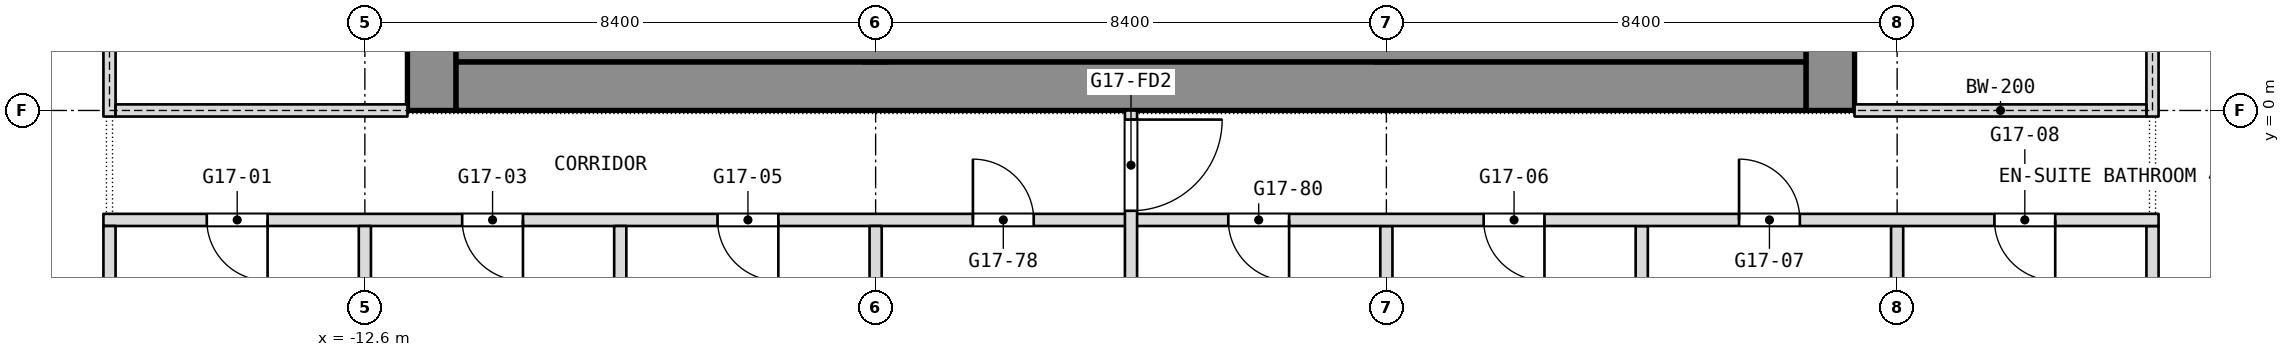
"""IFC4 building model, lengths in metres.
Left out: names, types, materials, properties, quantities, classifications, styles, units other than length and angle.
Written with IfcOpenShell. Run it as: python <this file> out.ifc"""

import sys

from ifc_helpers import new_model, si_unit, direction, frame, frame_2d, origin, place, context, subcontext, project, spatial, rectangle, extrude, element, fill, save


model = new_model("IFC4")
c1 = context("Model", 3, precision=1e-05, world=origin(), true_north=direction((0.0, 1.0)))
c2 = subcontext(c1, "Body", "Model", "MODEL_VIEW")
j1 = project(units=[si_unit("LENGTHUNIT", "METRE"), si_unit("PLANEANGLEUNIT", "RADIAN")], contexts=[c1])
p1 = place(None, origin())
s1 = spatial("IfcSite", under=j1, at=p1, CompositionType="ELEMENT")
p2 = place(p1, origin())
s2 = spatial("IfcBuilding", under=s1, at=p2, CompositionType="ELEMENT")
p3 = place(p2, frame((0.0, 0.0, 209.3)))
s3 = spatial("IfcBuildingStorey", under=s2, at=p3, CompositionType="ELEMENT", Elevation=209.3)
p4 = place(p3, frame((11.5, 0.0, 0.0), z_axis=(0.0, 0.0, 1.0), x_axis=(0.0, 1.0, 0.0)))
e1 = element("IfcWall", 1, at=p4, inside=s3, PredefinedType="SHEAR", context=c2, shape_type="SweptSolid", body=[
    extrude(rectangle(XDim=16.8, YDim=0.8, at=frame_2d((8.4, 0.0))), origin(), (0.0, 0.0, 1.0), 3.6),
])
p5 = place(p4, frame((2.3, 0.0, 0.0)))
e2 = element("IfcOpeningElement", 2, at=p5, cuts=e1, PredefinedType="OPENING", context=c2, shape_type="SweptSolid", body=[
    extrude(rectangle(XDim=1.1, YDim=2.1, at=frame_2d((0.55, 1.05))), frame((0.0, 0.4, 0.0), z_axis=(0.0, -1.0, 0.0), x_axis=(1.0, 0.0, 0.0)), (0.0, 0.0, 1.0), 0.8),
])
p6 = place(p4, frame((4.85, 0.0, 0.0)))
e3 = element("IfcOpeningElement", 3, at=p6, cuts=e1, PredefinedType="OPENING", context=c2, shape_type="SweptSolid", body=[
    extrude(rectangle(XDim=1.1, YDim=2.1, at=frame_2d((0.55, 1.05))), frame((0.0, 0.4, 0.0), z_axis=(0.0, -1.0, 0.0), x_axis=(1.0, 0.0, 0.0)), (0.0, 0.0, 1.0), 0.8),
])
p7 = place(p4, frame((6.825, 0.0, 0.0)))
e4 = element("IfcOpeningElement", 4, at=p7, cuts=e1, PredefinedType="OPENING", context=c2, shape_type="SweptSolid", body=[
    extrude(rectangle(XDim=1.2, YDim=2.1, at=frame_2d((0.6, 1.05))), frame((0.0, 0.4, 0.0), z_axis=(0.0, -1.0, 0.0), x_axis=(1.0, 0.0, 0.0)), (0.0, 0.0, 1.0), 0.8),
])
p8 = place(p4, frame((13.4, 0.0, 0.0)))
e5 = element("IfcOpeningElement", 5, at=p8, cuts=e1, PredefinedType="OPENING", context=c2, shape_type="SweptSolid", body=[
    extrude(rectangle(XDim=1.1, YDim=2.1, at=frame_2d((0.55, 1.05))), frame((0.0, 0.4, 0.0), z_axis=(0.0, -1.0, 0.0), x_axis=(1.0, 0.0, 0.0)), (0.0, 0.0, 1.0), 0.8),
])
p9 = place(p4, frame((10.85, 0.0, 0.0)))
e6 = element("IfcOpeningElement", 6, at=p9, cuts=e1, PredefinedType="OPENING", context=c2, shape_type="SweptSolid", body=[
    extrude(rectangle(XDim=1.1, YDim=2.1, at=frame_2d((0.55, 1.05))), frame((0.0, 0.4, 0.0), z_axis=(0.0, -1.0, 0.0), x_axis=(1.0, 0.0, 0.0)), (0.0, 0.0, 1.0), 0.8),
])
p10 = place(p4, frame((8.775, 0.0, 0.0)))
e7 = element("IfcOpeningElement", 7, at=p10, cuts=e1, PredefinedType="OPENING", context=c2, shape_type="SweptSolid", body=[
    extrude(rectangle(XDim=1.2, YDim=2.1, at=frame_2d((0.6, 1.05))), frame((0.0, 0.4, 0.0), z_axis=(0.0, -1.0, 0.0), x_axis=(1.0, 0.0, 0.0)), (0.0, 0.0, 1.0), 0.8),
])
p11 = place(p3, frame((-11.5, 0.0, 0.0), z_axis=(0.0, 0.0, 1.0), x_axis=(0.0, 1.0, 0.0)))
e8 = element("IfcWall", 8, at=p11, inside=s3, PredefinedType="SHEAR", context=c2, shape_type="SweptSolid", body=[
    extrude(rectangle(XDim=16.8, YDim=0.8, at=frame_2d((8.4, 0.0))), origin(), (0.0, 0.0, 1.0), 3.6),
])
p12 = place(p11, frame((1.762, 0.0, 0.0)))
e9 = element("IfcOpeningElement", 9, at=p12, cuts=e8, PredefinedType="OPENING", context=c2, shape_type="SweptSolid", body=[
    extrude(rectangle(XDim=0.9, YDim=2.1, at=frame_2d((0.45, 1.05))), frame((0.0, 0.4, 0.0), z_axis=(0.0, -1.0, 0.0), x_axis=(1.0, 0.0, 0.0)), (0.0, 0.0, 1.0), 0.8),
])
p13 = place(p11, frame((4.387, 0.0, 0.0)))
e10 = element("IfcOpeningElement", 10, at=p13, cuts=e8, PredefinedType="OPENING", context=c2, shape_type="SweptSolid", body=[
    extrude(rectangle(XDim=0.9, YDim=2.1, at=frame_2d((0.45, 1.05))), frame((0.0, 0.4, 0.0), z_axis=(0.0, -1.0, 0.0), x_axis=(1.0, 0.0, 0.0)), (0.0, 0.0, 1.0), 0.8),
])
p14 = place(p11, frame((6.825, 0.0, 0.0)))
e11 = element("IfcOpeningElement", 11, at=p14, cuts=e8, PredefinedType="OPENING", context=c2, shape_type="SweptSolid", body=[
    extrude(rectangle(XDim=1.2, YDim=2.1, at=frame_2d((0.6, 1.05))), frame((0.0, 0.4, 0.0), z_axis=(0.0, -1.0, 0.0), x_axis=(1.0, 0.0, 0.0)), (0.0, 0.0, 1.0), 0.8),
])
p15 = place(p11, frame((12.3, 0.0, 0.0)))
e12 = element("IfcOpeningElement", 12, at=p15, cuts=e8, PredefinedType="OPENING", context=c2, shape_type="SweptSolid", body=[
    extrude(rectangle(XDim=0.9, YDim=2.1, at=frame_2d((0.45, 1.05))), frame((0.0, 0.4, 0.0), z_axis=(0.0, -1.0, 0.0), x_axis=(1.0, 0.0, 0.0)), (0.0, 0.0, 1.0), 0.8),
])
p16 = place(p11, frame((8.775, 0.0, 0.0)))
e13 = element("IfcOpeningElement", 13, at=p16, cuts=e8, PredefinedType="OPENING", context=c2, shape_type="SweptSolid", body=[
    extrude(rectangle(XDim=1.2, YDim=2.1, at=frame_2d((0.6, 1.05))), frame((0.0, 0.4, 0.0), z_axis=(0.0, -1.0, 0.0), x_axis=(1.0, 0.0, 0.0)), (0.0, 0.0, 1.0), 0.8),
])
p17 = place(p3, frame((-11.1, 0.4, 0.0), z_axis=(0.0, 0.0, 1.0), x_axis=(1.0, 0.0, 0.0)))
e14 = element("IfcWall", 14, at=p17, inside=s3, PredefinedType="SHEAR", context=c2, shape_type="SweptSolid", body=[
    extrude(rectangle(XDim=22.2, YDim=0.8, at=frame_2d((11.1, 0.0))), origin(), (0.0, 0.0, 1.0), 3.6),
])
p18 = place(p3, frame((-4.2, 0.8, 0.0), z_axis=(0.0, 0.0, 1.0), x_axis=(0.0, 1.0, 0.0)))
e15 = element("IfcWall", 15, at=p18, inside=s3, PredefinedType="SHEAR", context=c2, shape_type="SweptSolid", body=[
    extrude(rectangle(XDim=15.2, YDim=0.4, at=frame_2d((7.6, 0.0))), origin(), (0.0, 0.0, 1.0), 3.6),
])
p19 = place(p18, frame((8.5, 0.0, 0.0)))
e16 = element("IfcOpeningElement", 16, at=p19, cuts=e15, PredefinedType="OPENING", context=c2, shape_type="SweptSolid", body=[
    extrude(rectangle(XDim=1.2, YDim=2.1, at=frame_2d((0.6, 1.05))), frame((0.0, 0.2, 0.0), z_axis=(0.0, -1.0, 0.0), x_axis=(1.0, 0.0, 0.0)), (0.0, 0.0, 1.0), 0.4),
])
p20 = place(p3, frame((4.2, 0.8, 0.0), z_axis=(0.0, 0.0, 1.0), x_axis=(0.0, 1.0, 0.0)))
e17 = element("IfcWall", 17, at=p20, inside=s3, PredefinedType="SHEAR", context=c2, shape_type="SweptSolid", body=[
    extrude(rectangle(XDim=15.2, YDim=0.4, at=frame_2d((7.6, 0.0))), origin(), (0.0, 0.0, 1.0), 3.6),
])
p21 = place(p20, frame((5.95, 0.0, 0.0)))
e18 = element("IfcOpeningElement", 18, at=p21, cuts=e17, PredefinedType="OPENING", context=c2, shape_type="SweptSolid", body=[
    extrude(rectangle(XDim=1.2, YDim=2.1, at=frame_2d((0.6, 1.05))), frame((0.0, 0.2, 0.0), z_axis=(0.0, -1.0, 0.0), x_axis=(1.0, 0.0, 0.0)), (0.0, 0.0, 1.0), 0.4),
])
for number, where, z_axis, x_axis in (
    (19, (16.8, -7.8, 0.0), (0.0, 0.0, 1.0), (0.0, 1.0, 0.0)),
    (20, (12.6, -7.8, 0.0), (0.0, 0.0, 1.0), (0.0, 1.0, 0.0)),
):
    element("IfcWall", number, at=place(p3, frame(where, z_axis=z_axis, x_axis=x_axis)), inside=s3, PredefinedType="PARTITIONING", context=c2, shape_type="SweptSolid", body=[
        extrude(rectangle(XDim=5.9, YDim=0.2, at=frame_2d((2.95, 0.0))), origin(), (0.0, 0.0, 1.0), 3.34),
    ])
p22 = place(p3, frame((8.4, -8.0, 0.0), z_axis=(0.0, 0.0, 1.0), x_axis=(0.0, 1.0, 0.0)))
e21 = element("IfcWall", 21, at=p22, inside=s3, PredefinedType="PARTITIONING", context=c2, shape_type="SweptSolid", body=[
    extrude(rectangle(XDim=6.1, YDim=0.2, at=frame_2d((3.05, 0.0))), origin(), (0.0, 0.0, 1.0), 3.34),
])
p23 = place(p3, frame((4.2, -11.6, 0.0), z_axis=(0.0, 0.0, 1.0), x_axis=(0.0, 1.0, 0.0)))
e22 = element("IfcWall", 22, at=p23, inside=s3, PredefinedType="PARTITIONING", context=c2, shape_type="SweptSolid", body=[
    extrude(rectangle(XDim=9.7, YDim=0.2, at=frame_2d((4.85, 0.0))), origin(), (0.0, 0.0, 1.0), 3.34),
])
p24 = place(p3, frame((-16.9, -1.8, 0.0), z_axis=(0.0, 0.0, 1.0), x_axis=(1.0, 0.0, 0.0)))
e23 = element("IfcWall", 23, at=p24, inside=s3, PredefinedType="PARTITIONING", context=c2, shape_type="SweptSolid", body=[
    extrude(rectangle(XDim=33.8, YDim=0.2, at=frame_2d((16.9, 0.0))), origin(), (0.0, 0.0, 1.0), 3.34),
])
p25 = place(p24, frame((1.7, 0.0, 0.0)))
e24 = element("IfcOpeningElement", 24, at=p25, cuts=e23, PredefinedType="OPENING", context=c2, shape_type="SweptSolid", body=[
    extrude(rectangle(XDim=1.0, YDim=2.1, at=frame_2d((0.5, 1.05))), frame((0.0, 0.1, 0.0), z_axis=(0.0, -1.0, 0.0), x_axis=(1.0, 0.0, 0.0)), (0.0, 0.0, 1.0), 0.2),
])
p26 = place(p24, frame((5.9, 0.0, 0.0)))
e25 = element("IfcOpeningElement", 25, at=p26, cuts=e23, PredefinedType="OPENING", context=c2, shape_type="SweptSolid", body=[
    extrude(rectangle(XDim=1.0, YDim=2.1, at=frame_2d((0.5, 1.05))), frame((0.0, 0.1, 0.0), z_axis=(0.0, -1.0, 0.0), x_axis=(1.0, 0.0, 0.0)), (0.0, 0.0, 1.0), 0.2),
])
p27 = place(p24, frame((10.1, 0.0, 0.0)))
e26 = element("IfcOpeningElement", 26, at=p27, cuts=e23, PredefinedType="OPENING", context=c2, shape_type="SweptSolid", body=[
    extrude(rectangle(XDim=1.0, YDim=2.1, at=frame_2d((0.5, 1.05))), frame((0.0, 0.1, 0.0), z_axis=(0.0, -1.0, 0.0), x_axis=(1.0, 0.0, 0.0)), (0.0, 0.0, 1.0), 0.2),
])
p28 = place(p24, frame((22.7, 0.0, 0.0)))
e27 = element("IfcOpeningElement", 27, at=p28, cuts=e23, PredefinedType="OPENING", context=c2, shape_type="SweptSolid", body=[
    extrude(rectangle(XDim=1.0, YDim=2.1, at=frame_2d((0.5, 1.05))), frame((0.0, 0.1, 0.0), z_axis=(0.0, -1.0, 0.0), x_axis=(1.0, 0.0, 0.0)), (0.0, 0.0, 1.0), 0.2),
])
p29 = place(p24, frame((26.9, 0.0, 0.0)))
e28 = element("IfcOpeningElement", 28, at=p29, cuts=e23, PredefinedType="OPENING", context=c2, shape_type="SweptSolid", body=[
    extrude(rectangle(XDim=1.0, YDim=2.1, at=frame_2d((0.5, 1.05))), frame((0.0, 0.1, 0.0), z_axis=(0.0, -1.0, 0.0), x_axis=(1.0, 0.0, 0.0)), (0.0, 0.0, 1.0), 0.2),
])
p30 = place(p24, frame((31.1, 0.0, 0.0)))
e29 = element("IfcOpeningElement", 29, at=p30, cuts=e23, PredefinedType="OPENING", context=c2, shape_type="SweptSolid", body=[
    extrude(rectangle(XDim=1.0, YDim=2.1, at=frame_2d((0.5, 1.05))), frame((0.0, 0.1, 0.0), z_axis=(0.0, -1.0, 0.0), x_axis=(1.0, 0.0, 0.0)), (0.0, 0.0, 1.0), 0.2),
])
p31 = place(p24, frame((14.3, 0.0, 0.0)))
e30 = element("IfcOpeningElement", 30, at=p31, cuts=e23, PredefinedType="OPENING", context=c2, shape_type="SweptSolid", body=[
    extrude(rectangle(XDim=1.0, YDim=2.1, at=frame_2d((0.5, 1.05))), frame((0.0, 0.1, 0.0), z_axis=(0.0, -1.0, 0.0), x_axis=(1.0, 0.0, 0.0)), (0.0, 0.0, 1.0), 0.2),
])
p32 = place(p24, frame((18.5, 0.0, 0.0)))
e31 = element("IfcOpeningElement", 31, at=p32, cuts=e23, PredefinedType="OPENING", context=c2, shape_type="SweptSolid", body=[
    extrude(rectangle(XDim=1.0, YDim=2.1, at=frame_2d((0.5, 1.05))), frame((0.0, 0.1, 0.0), z_axis=(0.0, -1.0, 0.0), x_axis=(1.0, 0.0, 0.0)), (0.0, 0.0, 1.0), 0.2),
])
p33 = place(p3, frame((0.0, -13.6, 0.0), z_axis=(0.0, 0.0, 1.0), x_axis=(0.0, 1.0, 0.0)))
e32 = element("IfcWall", 32, at=p33, inside=s3, PredefinedType="PARTITIONING", context=c2, shape_type="SweptSolid", body=[
    extrude(rectangle(XDim=13.6, YDim=0.2, at=frame_2d((6.8, 0.0))), origin(), (0.0, 0.0, 1.0), 3.34),
])
p34 = place(p33, frame((11.95, 0.0, 0.0)))
e33 = element("IfcOpeningElement", 33, at=p34, cuts=e32, PredefinedType="OPENING", context=c2, shape_type="SweptSolid", body=[
    extrude(rectangle(XDim=1.5, YDim=2.1, at=frame_2d((0.75, 1.05))), frame((0.0, 0.1, 0.0), z_axis=(0.0, -1.0, 0.0), x_axis=(1.0, 0.0, 0.0)), (0.0, 0.0, 1.0), 0.2),
])
p35 = place(p33, frame((0.25, 0.0, 0.0)))
e34 = element("IfcOpeningElement", 34, at=p35, cuts=e32, PredefinedType="OPENING", context=c2, shape_type="SweptSolid", body=[
    extrude(rectangle(XDim=1.5, YDim=2.1, at=frame_2d((0.75, 1.05))), frame((0.0, 0.1, 0.0), z_axis=(0.0, -1.0, 0.0), x_axis=(1.0, 0.0, 0.0)), (0.0, 0.0, 1.0), 0.2),
])
p36 = place(p3, frame((-4.2, -11.6, 0.0), z_axis=(0.0, 0.0, 1.0), x_axis=(0.0, 1.0, 0.0)))
e35 = element("IfcWall", 35, at=p36, inside=s3, PredefinedType="PARTITIONING", context=c2, shape_type="SweptSolid", body=[
    extrude(rectangle(XDim=9.7, YDim=0.2, at=frame_2d((4.85, 0.0))), origin(), (0.0, 0.0, 1.0), 3.34),
])
p37 = place(p3, frame((-8.4, -8.0, 0.0), z_axis=(0.0, 0.0, 1.0), x_axis=(0.0, 1.0, 0.0)))
e36 = element("IfcWall", 36, at=p37, inside=s3, PredefinedType="PARTITIONING", context=c2, shape_type="SweptSolid", body=[
    extrude(rectangle(XDim=6.1, YDim=0.2, at=frame_2d((3.05, 0.0))), origin(), (0.0, 0.0, 1.0), 3.34),
])
p38 = place(p3, frame((-12.6, -7.8, 0.0), z_axis=(0.0, 0.0, 1.0), x_axis=(0.0, 1.0, 0.0)))
e37 = element("IfcWall", 37, at=p38, inside=s3, PredefinedType="PARTITIONING", context=c2, shape_type="SweptSolid", body=[
    extrude(rectangle(XDim=5.9, YDim=0.2, at=frame_2d((2.95, 0.0))), origin(), (0.0, 0.0, 1.0), 3.34),
])
p39 = place(p3, frame((-16.8, -8.0, 0.0), z_axis=(0.0, 0.0, 1.0), x_axis=(0.0, 1.0, 0.0)))
e38 = element("IfcWall", 38, at=p39, inside=s3, PredefinedType="PARTITIONING", context=c2, shape_type="SweptSolid", body=[
    extrude(rectangle(XDim=6.1, YDim=0.2, at=frame_2d((3.05, 0.0))), origin(), (0.0, 0.0, 1.0), 3.34),
])
p40 = place(p3, frame((-11.1, 1.15, 0.0), z_axis=(0.0, 0.0, 1.0), x_axis=(1.0, 0.0, 0.0)))
e39 = element("IfcWall", 39, at=p40, inside=s3, PredefinedType="PARTITIONING", context=c2, shape_type="SweptSolid", body=[
    extrude(rectangle(XDim=22.2, YDim=0.7, at=frame_2d((11.1, 0.0))), origin(), (0.0, 0.0, 1.0), 3.34),
])
p41 = place(p3, frame((-16.8, -0.1, 0.0), z_axis=(0.0, 0.0, 1.0), x_axis=(0.0, 1.0, 0.0)))
e40 = element("IfcWall", 40, at=p41, inside=s3, PredefinedType="PARTITIONING", context=c2, shape_type="SweptSolid", body=[
    extrude(rectangle(XDim=17.0, YDim=0.2, at=frame_2d((8.5, 0.0))), origin(), (0.0, 0.0, 1.0), 3.34),
])
p42 = place(p41, frame((2.2, 0.0, 0.0)))
e41 = element("IfcOpeningElement", 41, at=p42, cuts=e40, PredefinedType="OPENING", context=c2, shape_type="SweptSolid", body=[
    extrude(rectangle(XDim=1.8, YDim=2.1, at=frame_2d((0.9, 1.05))), frame((0.0, 0.1, 0.0), z_axis=(0.0, -1.0, 0.0), x_axis=(1.0, 0.0, 0.0)), (0.0, 0.0, 1.0), 0.2),
])
p43 = place(p41, frame((13.0, 0.0, 0.0)))
e42 = element("IfcOpeningElement", 42, at=p43, cuts=e40, PredefinedType="OPENING", context=c2, shape_type="SweptSolid", body=[
    extrude(rectangle(XDim=1.8, YDim=2.1, at=frame_2d((0.9, 1.05))), frame((0.0, 0.1, 0.0), z_axis=(0.0, -1.0, 0.0), x_axis=(1.0, 0.0, 0.0)), (0.0, 0.0, 1.0), 0.2),
])
p44 = place(p3, frame((-16.7, 0.0, 0.0), z_axis=(0.0, 0.0, 1.0), x_axis=(1.0, 0.0, 0.0)))
e43 = element("IfcWall", 43, at=p44, inside=s3, PredefinedType="PARTITIONING", context=c2, shape_type="SweptSolid", body=[
    extrude(rectangle(XDim=4.8, YDim=0.2, at=frame_2d((2.4, 0.0))), origin(), (0.0, 0.0, 1.0), 2.94),
])
p45 = place(p3, frame((16.8, -0.1, 0.0), z_axis=(0.0, 0.0, 1.0), x_axis=(0.0, 1.0, 0.0)))
e44 = element("IfcWall", 44, at=p45, inside=s3, PredefinedType="PARTITIONING", context=c2, shape_type="SweptSolid", body=[
    extrude(rectangle(XDim=17.0, YDim=0.2, at=frame_2d((8.5, 0.0))), origin(), (0.0, 0.0, 1.0), 3.34),
])
p46 = place(p45, frame((2.2, 0.0, 0.0)))
e45 = element("IfcOpeningElement", 45, at=p46, cuts=e44, PredefinedType="OPENING", context=c2, shape_type="SweptSolid", body=[
    extrude(rectangle(XDim=1.8, YDim=2.1, at=frame_2d((0.9, 1.05))), frame((0.0, 0.1, 0.0), z_axis=(0.0, -1.0, 0.0), x_axis=(1.0, 0.0, 0.0)), (0.0, 0.0, 1.0), 0.2),
])
p47 = place(p45, frame((13.0, 0.0, 0.0)))
e46 = element("IfcOpeningElement", 46, at=p47, cuts=e44, PredefinedType="OPENING", context=c2, shape_type="SweptSolid", body=[
    extrude(rectangle(XDim=1.8, YDim=2.1, at=frame_2d((0.9, 1.05))), frame((0.0, 0.1, 0.0), z_axis=(0.0, -1.0, 0.0), x_axis=(1.0, 0.0, 0.0)), (0.0, 0.0, 1.0), 0.2),
])
p48 = place(p3, frame((11.9, 0.0, 0.0), z_axis=(0.0, 0.0, 1.0), x_axis=(1.0, 0.0, 0.0)))
e47 = element("IfcWall", 47, at=p48, inside=s3, PredefinedType="PARTITIONING", context=c2, shape_type="SweptSolid", body=[
    extrude(rectangle(XDim=4.8, YDim=0.2, at=frame_2d((2.4, 0.0))), origin(), (0.0, 0.0, 1.0), 2.94),
])
p49 = place(p25, origin())
e48 = element("IfcDoor", 48, at=p49, inside=s3, OperationType="SINGLE_SWING_LEFT", PredefinedType="DOOR", context=c2, shape_type="SweptSolid", body=[
    extrude(rectangle(XDim=1.0, YDim=2.1, at=frame_2d((0.5, 1.05))), frame((0.0, 0.025, 0.0), z_axis=(0.0, -1.0, 0.0), x_axis=(1.0, 0.0, 0.0)), (0.0, 0.0, 1.0), 0.05),
])
fill(e24, e48)
p50 = place(p26, origin())
e49 = element("IfcDoor", 49, at=p50, inside=s3, OperationType="SINGLE_SWING_LEFT", PredefinedType="DOOR", context=c2, shape_type="SweptSolid", body=[
    extrude(rectangle(XDim=1.0, YDim=2.1, at=frame_2d((0.5, 1.05))), frame((0.0, 0.025, 0.0), z_axis=(0.0, -1.0, 0.0), x_axis=(1.0, 0.0, 0.0)), (0.0, 0.0, 1.0), 0.05),
])
fill(e25, e49)
p51 = place(p27, origin())
e50 = element("IfcDoor", 50, at=p51, inside=s3, OperationType="SINGLE_SWING_RIGHT", PredefinedType="DOOR", context=c2, shape_type="SweptSolid", body=[
    extrude(rectangle(XDim=1.0, YDim=2.1, at=frame_2d((0.5, 1.05))), frame((0.0, 0.025, 0.0), z_axis=(0.0, -1.0, 0.0), x_axis=(1.0, 0.0, 0.0)), (0.0, 0.0, 1.0), 0.05),
])
fill(e26, e50)
p52 = place(p28, origin())
e51 = element("IfcDoor", 51, at=p52, inside=s3, OperationType="SINGLE_SWING_LEFT", PredefinedType="DOOR", context=c2, shape_type="SweptSolid", body=[
    extrude(rectangle(XDim=1.0, YDim=2.1, at=frame_2d((0.5, 1.05))), frame((0.0, 0.025, 0.0), z_axis=(0.0, -1.0, 0.0), x_axis=(1.0, 0.0, 0.0)), (0.0, 0.0, 1.0), 0.05),
])
fill(e27, e51)
p53 = place(p29, origin())
e52 = element("IfcDoor", 52, at=p53, inside=s3, OperationType="SINGLE_SWING_RIGHT", PredefinedType="DOOR", context=c2, shape_type="SweptSolid", body=[
    extrude(rectangle(XDim=1.0, YDim=2.1, at=frame_2d((0.5, 1.05))), frame((0.0, 0.025, 0.0), z_axis=(0.0, -1.0, 0.0), x_axis=(1.0, 0.0, 0.0)), (0.0, 0.0, 1.0), 0.05),
])
fill(e28, e52)
p54 = place(p30, origin())
e53 = element("IfcDoor", 53, at=p54, inside=s3, OperationType="SINGLE_SWING_LEFT", PredefinedType="DOOR", context=c2, shape_type="SweptSolid", body=[
    extrude(rectangle(XDim=1.0, YDim=2.1, at=frame_2d((0.5, 1.05))), frame((0.0, 0.025, 0.0), z_axis=(0.0, -1.0, 0.0), x_axis=(1.0, 0.0, 0.0)), (0.0, 0.0, 1.0), 0.05),
])
fill(e29, e53)
p55 = place(p31, origin())
e54 = element("IfcDoor", 54, at=p55, inside=s3, OperationType="SINGLE_SWING_LEFT", PredefinedType="DOOR", context=c2, shape_type="SweptSolid", body=[
    extrude(rectangle(XDim=1.0, YDim=2.1, at=frame_2d((0.5, 1.05))), frame((0.0, 0.025, 0.0), z_axis=(0.0, -1.0, 0.0), x_axis=(1.0, 0.0, 0.0)), (0.0, 0.0, 1.0), 0.05),
])
fill(e30, e54)
p56 = place(p32, origin())
e55 = element("IfcDoor", 55, at=p56, inside=s3, OperationType="SINGLE_SWING_LEFT", PredefinedType="DOOR", context=c2, shape_type="SweptSolid", body=[
    extrude(rectangle(XDim=1.0, YDim=2.1, at=frame_2d((0.5, 1.05))), frame((0.0, 0.025, 0.0), z_axis=(0.0, -1.0, 0.0), x_axis=(1.0, 0.0, 0.0)), (0.0, 0.0, 1.0), 0.05),
])
fill(e31, e55)
p57 = place(p34, origin())
e56 = element("IfcDoor", 56, at=p57, inside=s3, OperationType="DOUBLE_DOOR_DOUBLE_SWING", PredefinedType="DOOR", context=c2, shape_type="SweptSolid", body=[
    extrude(rectangle(XDim=1.5, YDim=2.1, at=frame_2d((0.75, 1.05))), frame((0.0, 0.025, 0.0), z_axis=(0.0, -1.0, 0.0), x_axis=(1.0, 0.0, 0.0)), (0.0, 0.0, 1.0), 0.05),
])
fill(e33, e56)
save(model, sys.argv[1])
